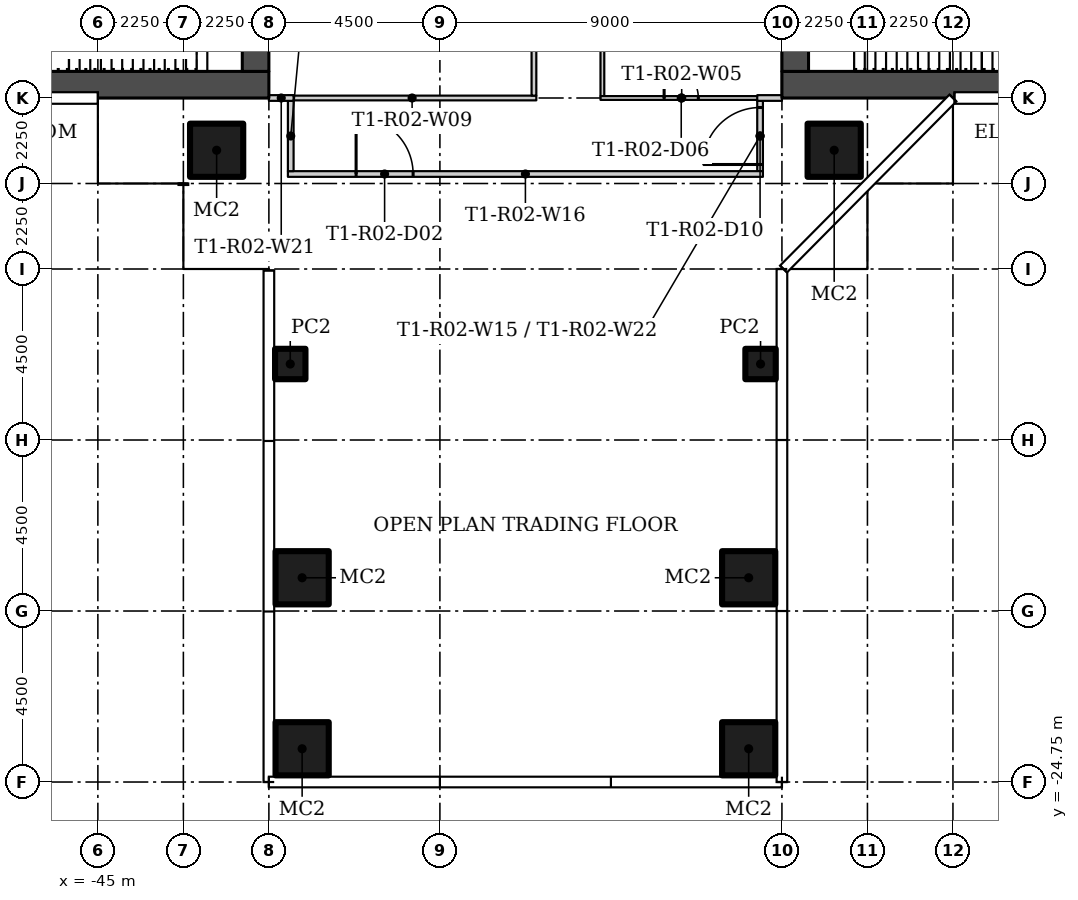
"""IFC4 building model, lengths in metres.
Left out: names, types, materials, properties, quantities, classifications, styles, units other than length and angle.
Written with IfcOpenShell. Run it as: python <this file> out.ifc"""

import sys

from ifc_helpers import new_model, si_unit, direction, frame, frame_2d, origin, origin_2d, place, context, subcontext, project, spatial, rectangle, hollow_rectangle, extrude, element, fill, save


model = new_model("IFC4")
c1 = context("Model", 3, precision=1e-05, world=origin(), true_north=direction((0.0, 1.0)))
c2 = subcontext(c1, "Body", "Model", "MODEL_VIEW")
j1 = project(units=[si_unit("LENGTHUNIT", "METRE"), si_unit("PLANEANGLEUNIT", "RADIAN")], contexts=[c1])
p1 = place(None, origin())
s1 = spatial("IfcSite", under=j1, at=p1, CompositionType="ELEMENT")
p2 = place(p1, origin())
s2 = spatial("IfcBuilding", under=s1, at=p2, CompositionType="ELEMENT")
p3 = place(p2, frame((0.0, 0.0, 33.0)))
s3 = spatial("IfcBuildingStorey", under=s2, at=p3, CompositionType="ELEMENT", Elevation=33.0)
for number, where in (
    (1, (-25.625, -8.125, 0.0)),
    (2, (-41.875, -8.125, 0.0)),
):
    element("IfcColumn", number, at=place(p3, frame(where)), inside=s3, PredefinedType="COLUMN", context=c2, shape_type="SweptSolid", body=[
        extrude(hollow_rectangle(XDim=1.4, YDim=1.4, WallThickness=0.05, at=origin_2d()), origin(), (0.0, 0.0, 1.0), 4.15),
    ])
p4 = place(p3, frame((-39.938, -13.75, 0.0)))
e3 = element("IfcColumn", 3, at=p4, inside=s3, PredefinedType="COLUMN", context=c2, shape_type="SweptSolid", body=[
    extrude(hollow_rectangle(XDim=0.8, YDim=0.8, WallThickness=0.025, at=origin_2d()), origin(), (0.0, 0.0, 1.0), 4.15),
])
for number, where in (
    (4, (-39.625, -19.375, 0.0)),
    (5, (-39.625, -23.875, 0.0)),
):
    element("IfcColumn", number, at=place(p3, frame(where)), inside=s3, PredefinedType="COLUMN", context=c2, shape_type="SweptSolid", body=[
        extrude(hollow_rectangle(XDim=1.4, YDim=1.4, WallThickness=0.05, at=origin_2d()), origin(), (0.0, 0.0, 1.0), 4.15),
    ])
p5 = place(p3, frame((-27.562, -13.75, 0.0)))
e6 = element("IfcColumn", 6, at=p5, inside=s3, PredefinedType="COLUMN", context=c2, shape_type="SweptSolid", body=[
    extrude(hollow_rectangle(XDim=0.8, YDim=0.8, WallThickness=0.025, at=origin_2d()), origin(), (0.0, 0.0, 1.0), 4.15),
])
for number, where in (
    (7, (-27.875, -19.375, 0.0)),
    (8, (-27.875, -23.875, 0.0)),
):
    element("IfcColumn", number, at=place(p3, frame(where)), inside=s3, PredefinedType="COLUMN", context=c2, shape_type="SweptSolid", body=[
        extrude(hollow_rectangle(XDim=1.4, YDim=1.4, WallThickness=0.05, at=origin_2d()), origin(), (0.0, 0.0, 1.0), 4.15),
    ])
p6 = place(p3, frame((-31.725, -0.0, 0.0), z_axis=(0.0, 0.0, 1.0), x_axis=(0.0, -1.0, 0.0)))
e9 = element("IfcWall", 9, at=p6, inside=s3, PredefinedType="PARTITIONING", context=c2, shape_type="SweptSolid", body=[
    extrude(rectangle(XDim=6.7, YDim=0.1, at=frame_2d((3.35, 0.0))), origin(), (0.0, 0.0, 1.0), 4.15),
])
p7 = place(p3, frame((-31.775, -6.75, 0.0)))
e10 = element("IfcWall", 10, at=p7, inside=s3, PredefinedType="PARTITIONING", context=c2, shape_type="SweptSolid", body=[
    extrude(rectangle(XDim=4.274, YDim=0.1, at=frame_2d((2.137, 0.0))), origin(), (0.0, 0.0, 1.0), 4.15),
])
p8 = place(p7, frame((1.675, 0.0, 0.0)))
e11 = element("IfcOpeningElement", 11, at=p8, cuts=e10, PredefinedType="OPENING", context=c2, shape_type="SweptSolid", body=[
    extrude(rectangle(XDim=0.9, YDim=2.1, at=frame_2d((0.45, 1.05))), frame((0.0, 0.06, 0.0), z_axis=(0.0, -1.0, 0.0), x_axis=(1.0, 0.0, 0.0)), (0.0, 0.0, 1.0), 0.12),
])
p9 = place(p3, frame((-40.0, -6.75, 0.0)))
e12 = element("IfcWall", 12, at=p9, inside=s3, PredefinedType="PARTITIONING", context=c2, shape_type="SweptSolid", body=[
    extrude(rectangle(XDim=6.537, YDim=0.125, at=frame_2d((3.269, 0.0))), origin(), (0.0, 0.0, 1.0), 4.15),
])
p10 = place(p3, frame((-33.525, -6.688, 0.0), z_axis=(0.0, 0.0, 1.0), x_axis=(0.0, 1.0, 0.0)))
e13 = element("IfcWall", 13, at=p10, inside=s3, PredefinedType="PARTITIONING", context=c2, shape_type="SweptSolid", body=[
    extrude(rectangle(XDim=6.675, YDim=0.125, at=frame_2d((3.337, 0.0))), origin(), (0.0, 0.0, 1.0), 4.15),
])
p11 = place(p10, frame((2.887, 0.0, 0.0)))
e14 = element("IfcOpeningElement", 14, at=p11, cuts=e13, PredefinedType="OPENING", context=c2, shape_type="SweptSolid", body=[
    extrude(rectangle(XDim=0.9, YDim=2.1, at=frame_2d((0.45, 1.05))), frame((0.0, 0.073, 0.0), z_axis=(0.0, -1.0, 0.0), x_axis=(1.0, 0.0, 0.0)), (0.0, 0.0, 1.0), 0.145),
])
p12 = place(p3, frame((-27.575, -8.675, 0.0), z_axis=(0.0, 0.0, 1.0), x_axis=(0.0, 1.0, 0.0)))
e15 = element("IfcWall", 15, at=p12, inside=s3, PredefinedType="PARTITIONING", context=c2, shape_type="SweptSolid", body=[
    extrude(rectangle(XDim=1.85, YDim=0.15, at=frame_2d((0.925, 0.0))), origin(), (0.0, 0.0, 1.0), 4.15),
])
p13 = place(p12, frame((0.175, 0.0, 0.0)))
e16 = element("IfcOpeningElement", 16, at=p13, cuts=e15, PredefinedType="OPENING", context=c2, shape_type="SweptSolid", body=[
    extrude(rectangle(XDim=1.5, YDim=2.4, at=frame_2d((0.75, 1.2))), frame((0.0, 0.085, 0.0), z_axis=(0.0, -1.0, 0.0), x_axis=(1.0, 0.0, 0.0)), (0.0, 0.0, 1.0), 0.17),
])
p14 = place(p3, frame((-40.0, -8.75, 0.0)))
e17 = element("IfcWall", 17, at=p14, inside=s3, PredefinedType="PARTITIONING", context=c2, shape_type="SweptSolid", body=[
    extrude(rectangle(XDim=12.5, YDim=0.15, at=frame_2d((6.25, 0.0))), origin(), (0.0, 0.0, 1.0), 4.15),
])
p15 = place(p14, frame((1.795, 0.0, 0.0)))
e18 = element("IfcOpeningElement", 18, at=p15, cuts=e17, PredefinedType="OPENING", context=c2, shape_type="SweptSolid", body=[
    extrude(rectangle(XDim=1.5, YDim=2.4, at=frame_2d((0.75, 1.2))), frame((0.0, 0.085, 0.0), z_axis=(0.0, -1.0, 0.0), x_axis=(1.0, 0.0, 0.0)), (0.0, 0.0, 1.0), 0.17),
])
p16 = place(p3, frame((-39.925, -6.825, 0.0), z_axis=(0.0, 0.0, 1.0), x_axis=(0.0, -1.0, 0.0)))
e19 = element("IfcWall", 19, at=p16, inside=s3, PredefinedType="PARTITIONING", context=c2, shape_type="SweptSolid", body=[
    extrude(rectangle(XDim=1.85, YDim=0.15, at=frame_2d((0.925, 0.0))), origin(), (0.0, 0.0, 1.0), 4.15),
])
for number, where in (
    (20, (-40.5, -6.75, 0.0)),
    (21, (-27.65, -6.75, 0.0)),
):
    element("IfcWall", number, at=place(p3, frame(where)), inside=s3, PredefinedType="PARTITIONING", context=c2, shape_type="SweptSolid", body=[
        extrude(rectangle(XDim=0.65, YDim=0.15, at=frame_2d((0.325, 0.0))), origin(), (0.0, 0.0, 1.0), 4.15),
    ])
p17 = place(p3, frame((-27.0, -6.4, 0.0)))
e22 = element("IfcWall", 22, at=p17, inside=s3, PredefinedType="SHEAR", context=c2, shape_type="SweptSolid", body=[
    extrude(rectangle(XDim=13.5, YDim=0.7, at=frame_2d((6.75, 0.0))), origin(), (0.0, 0.0, 1.0), 4.15),
])
p18 = place(p3, frame((-26.65, 6.05, 0.0), z_axis=(0.0, 0.0, 1.0), x_axis=(0.0, -1.0, 0.0)))
e23 = element("IfcWall", 23, at=p18, inside=s3, PredefinedType="SHEAR", context=c2, shape_type="SweptSolid", body=[
    extrude(rectangle(XDim=12.1, YDim=0.7, at=frame_2d((6.05, 0.0))), origin(), (0.0, 0.0, 1.0), 4.15),
])
p19 = place(p18, frame((3.9, 0.0, 0.0)))
e24 = element("IfcOpeningElement", 24, at=p19, cuts=e23, PredefinedType="OPENING", context=c2, shape_type="SweptSolid", body=[
    extrude(rectangle(XDim=1.8, YDim=2.4, at=frame_2d((0.9, 1.2))), frame((0.0, 0.36, 0.0), z_axis=(0.0, -1.0, 0.0), x_axis=(1.0, 0.0, 0.0)), (0.0, 0.0, 1.0), 0.72),
])
p20 = place(p3, frame((-40.5, -6.4, 0.0), z_axis=(0.0, 0.0, 1.0), x_axis=(-1.0, 0.0, 0.0)))
e25 = element("IfcWall", 25, at=p20, inside=s3, PredefinedType="SHEAR", context=c2, shape_type="SweptSolid", body=[
    extrude(rectangle(XDim=13.5, YDim=0.7, at=frame_2d((6.75, 0.0))), origin(), (0.0, 0.0, 1.0), 4.15),
])
p21 = place(p3, frame((-40.85, -6.05, 0.0), z_axis=(0.0, 0.0, 1.0), x_axis=(0.0, 1.0, 0.0)))
e26 = element("IfcWall", 26, at=p21, inside=s3, PredefinedType="SHEAR", context=c2, shape_type="SweptSolid", body=[
    extrude(rectangle(XDim=12.1, YDim=0.7, at=frame_2d((6.05, 0.0))), origin(), (0.0, 0.0, 1.0), 4.15),
])
p22 = place(p21, frame((6.4, 0.0, 0.0)))
e27 = element("IfcOpeningElement", 27, at=p22, cuts=e26, PredefinedType="OPENING", context=c2, shape_type="SweptSolid", body=[
    extrude(rectangle(XDim=1.8, YDim=2.4, at=frame_2d((0.9, 1.2))), frame((0.0, 0.36, 0.0), z_axis=(0.0, -1.0, 0.0), x_axis=(1.0, 0.0, 0.0)), (0.0, 0.0, 1.0), 0.72),
])
p23 = place(p15, origin())
e28 = element("IfcDoor", 28, at=p23, inside=s3, OperationType="DOUBLE_DOOR_SINGLE_SWING", PredefinedType="DOOR", context=c2, shape_type="SweptSolid", body=[
    extrude(rectangle(XDim=1.5, YDim=2.4, at=frame_2d((0.75, 1.2))), frame((0.0, 0.025, 0.0), z_axis=(0.0, -1.0, 0.0), x_axis=(1.0, 0.0, 0.0)), (0.0, 0.0, 1.0), 0.05),
])
fill(e18, e28)
p24 = place(p8, origin())
e29 = element("IfcDoor", 29, at=p24, inside=s3, OperationType="SINGLE_SWING_RIGHT", PredefinedType="DOOR", context=c2, shape_type="SweptSolid", body=[
    extrude(rectangle(XDim=0.9, YDim=2.1, at=frame_2d((0.45, 1.05))), frame((0.0, 0.025, 0.0), z_axis=(0.0, -1.0, 0.0), x_axis=(1.0, 0.0, 0.0)), (0.0, 0.0, 1.0), 0.05),
])
fill(e11, e29)
p25 = place(p13, origin())
e30 = element("IfcDoor", 30, at=p25, inside=s3, OperationType="DOUBLE_DOOR_SINGLE_SWING", PredefinedType="DOOR", context=c2, shape_type="SweptSolid", body=[
    extrude(rectangle(XDim=1.5, YDim=2.4, at=frame_2d((0.75, 1.2))), frame((0.0, 0.025, 0.0), z_axis=(0.0, -1.0, 0.0), x_axis=(1.0, 0.0, 0.0)), (0.0, 0.0, 1.0), 0.05),
])
fill(e16, e30)
save(model, sys.argv[1])
